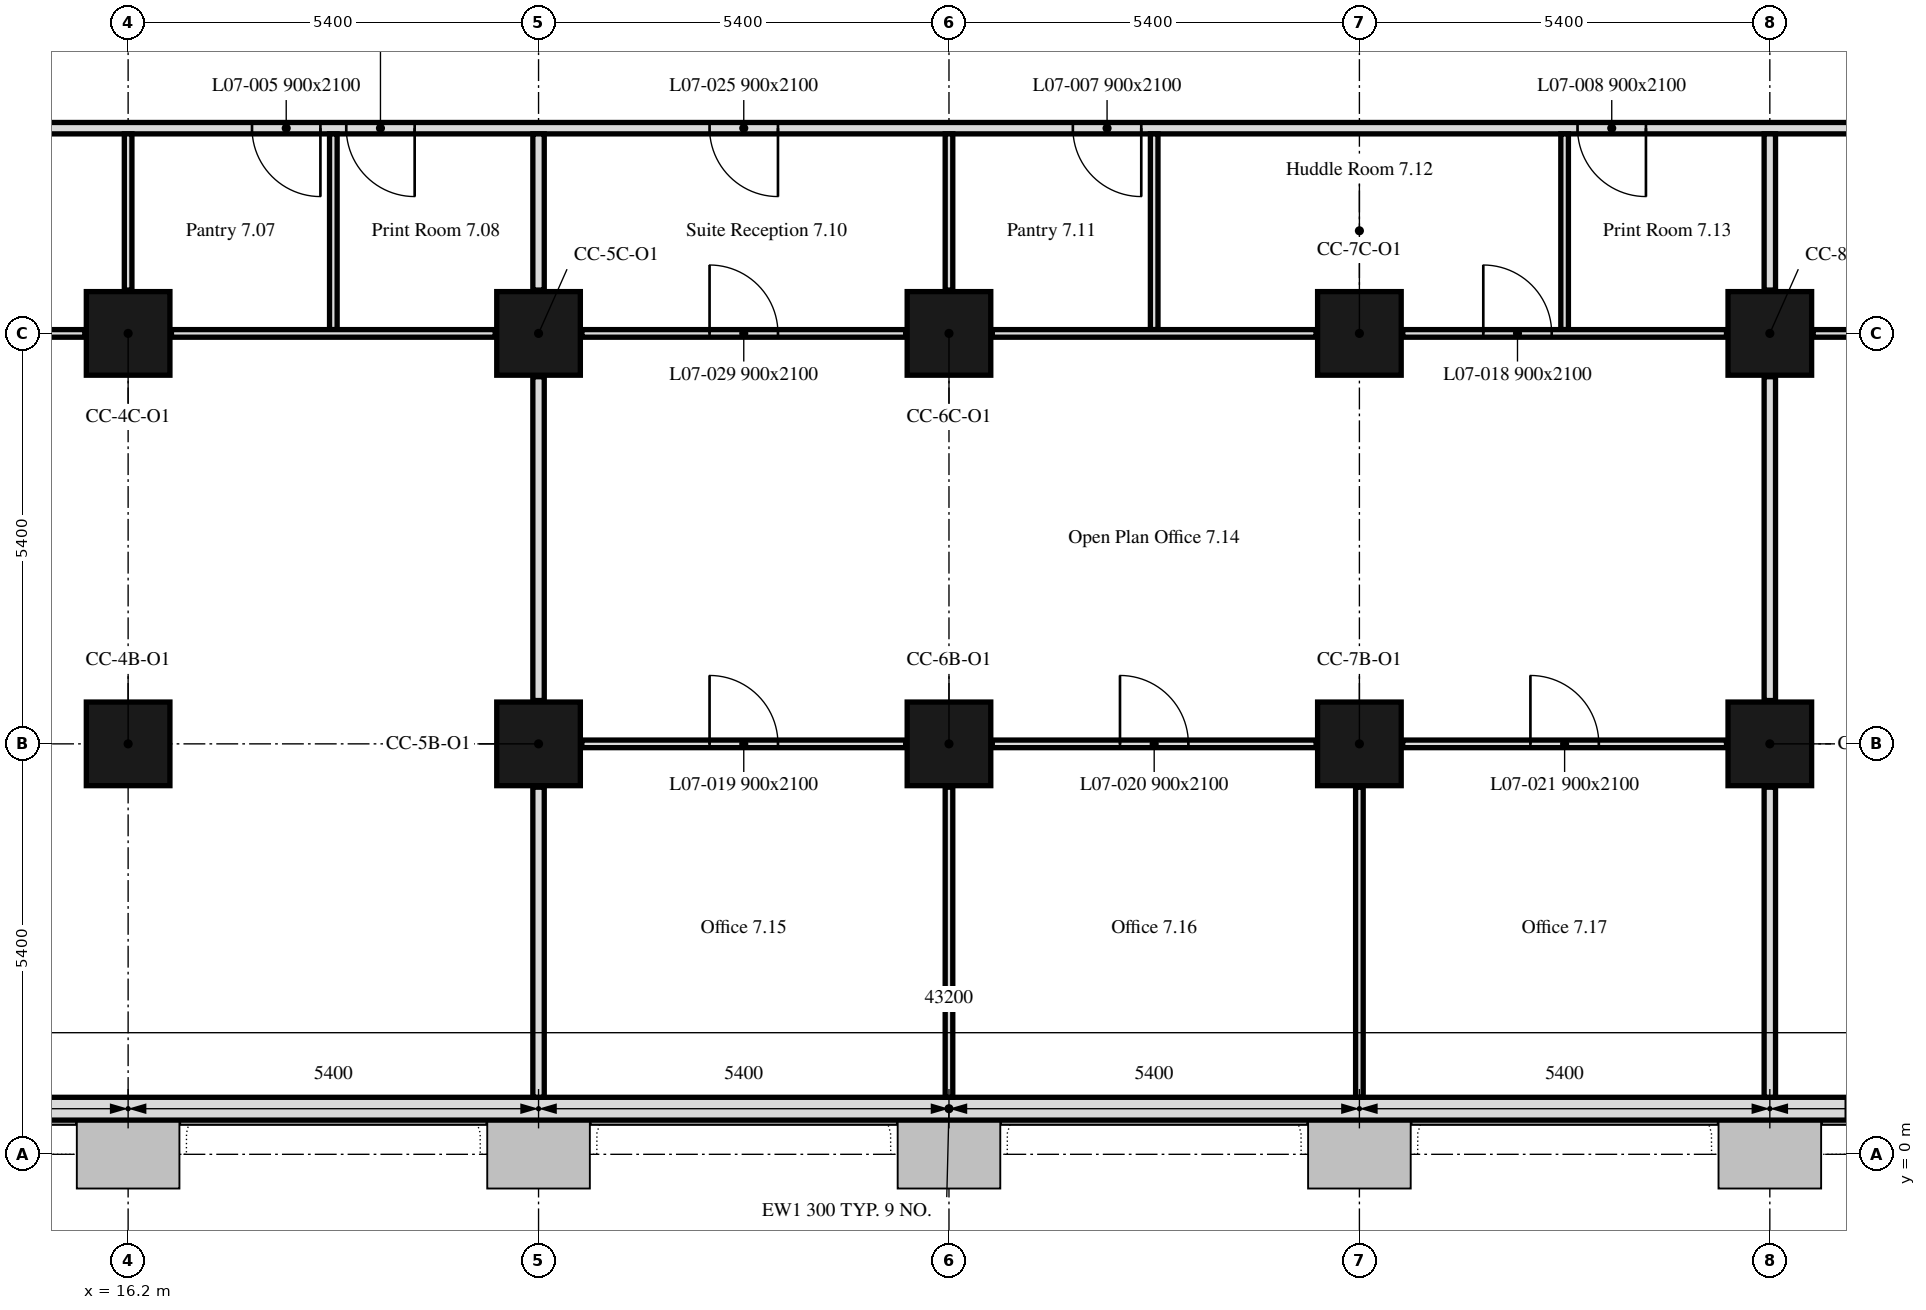
"""IFC4 building model, lengths in metres.
Left out: names, types, materials, properties, quantities, classifications, styles, units other than length and angle.
Written with IfcOpenShell. Run it as: python <this file> out.ifc"""

import sys

from ifc_helpers import new_model, si_unit, direction, frame, frame_2d, origin, origin_2d, place, context, subcontext, project, spatial, rectangle, extrude, element, fill, save


model = new_model("IFC4")
c1 = context("Model", 3, precision=1e-05, world=origin(), true_north=direction((0.0, 1.0)))
c2 = subcontext(c1, "Body", "Model", "MODEL_VIEW")
j1 = project(units=[si_unit("LENGTHUNIT", "METRE"), si_unit("PLANEANGLEUNIT", "RADIAN")], contexts=[c1])
p1 = place(None, origin())
s1 = spatial("IfcSite", under=j1, at=p1, CompositionType="ELEMENT")
p2 = place(p1, origin())
s2 = spatial("IfcBuilding", under=s1, at=p2, CompositionType="ELEMENT")
p3 = place(p2, frame((0.0, 0.0, 37.4)))
s3 = spatial("IfcBuildingStorey", under=s2, at=p3, CompositionType="ELEMENT", Elevation=37.4)
for number, where, z_axis, x_axis in (
    (1, (16.2, 5.4, 0.0), (0.0, 0.0, 1.0), (1.0, 0.0, 0.0)),
    (2, (21.6, 5.4, 0.0), (0.0, 0.0, 1.0), (1.0, 0.0, 0.0)),
    (3, (27.0, 5.4, 0.0), (0.0, 0.0, 1.0), (1.0, 0.0, 0.0)),
    (4, (32.4, 5.4, 0.0), (0.0, 0.0, 1.0), (1.0, 0.0, 0.0)),
    (5, (37.8, 5.4, 0.0), (0.0, 0.0, 1.0), (1.0, 0.0, 0.0)),
    (6, (16.2, 10.8, 0.0), (0.0, 0.0, 1.0), (1.0, 0.0, 0.0)),
    (7, (21.6, 10.8, 0.0), (0.0, 0.0, 1.0), (1.0, 0.0, 0.0)),
    (8, (27.0, 10.8, 0.0), (0.0, 0.0, 1.0), (1.0, 0.0, 0.0)),
    (9, (32.4, 10.8, 0.0), (0.0, 0.0, 1.0), (1.0, 0.0, 0.0)),
    (10, (37.8, 10.8, 0.0), (0.0, 0.0, 1.0), (1.0, 0.0, 0.0)),
):
    element("IfcColumn", number, at=place(p3, frame(where, z_axis=z_axis, x_axis=x_axis)), inside=s3, PredefinedType="COLUMN", context=c2, shape_type="SweptSolid", body=[
        extrude(rectangle(XDim=1.1, YDim=1.1, at=origin_2d()), origin(), (0.0, 0.0, 1.0), 3.5),
    ])
p4 = place(p3, frame((10.986, 0.6, 0.0), z_axis=(0.0, 0.0, 1.0), x_axis=(1.0, 0.0, 0.0)))
e11 = element("IfcWall", 11, at=p4, inside=s3, PredefinedType="SOLIDWALL", context=c2, shape_type="SweptSolid", body=[
    extrude(rectangle(XDim=32.027, YDim=0.3, at=frame_2d((16.014, 0.0))), origin(), (0.0, 0.0, 1.0), 3.5),
])
p5 = place(p4, frame((27.814, 0.0, 0.9)))
e12 = element("IfcOpeningElement", 12, at=p5, cuts=e11, PredefinedType="OPENING", context=c2, shape_type="SweptSolid", body=[
    extrude(rectangle(XDim=3.4, YDim=1.7, at=frame_2d((1.7, 0.85))), frame((0.0, 0.16, 0.0), z_axis=(0.0, -1.0, 0.0), x_axis=(1.0, 0.0, 0.0)), (0.0, 0.0, 1.0), 0.32),
])
p6 = place(p3, frame((47.849, 13.5, 0.0), z_axis=(0.0, 0.0, 1.0), x_axis=(-1.0, 0.0, 0.0)))
e13 = element("IfcWall", 13, at=p6, inside=s3, PredefinedType="PARTITIONING", context=c2, shape_type="SweptSolid", body=[
    extrude(rectangle(XDim=41.698, YDim=0.15, at=frame_2d((20.849, 0.0))), origin(), (0.0, 0.0, 1.0), 2.75),
])
p7 = place(p6, frame((29.119, 0.0, 0.0)))
e14 = element("IfcOpeningElement", 14, at=p7, cuts=e13, PredefinedType="OPENING", context=c2, shape_type="SweptSolid", body=[
    extrude(rectangle(XDim=0.9, YDim=2.1, at=frame_2d((0.45, 1.05))), frame((0.0, 0.075, 0.0), z_axis=(0.0, -1.0, 0.0), x_axis=(1.0, 0.0, 0.0)), (0.0, 0.0, 1.0), 0.15),
])
p8 = place(p6, frame((27.879, 0.0, 0.0)))
e15 = element("IfcOpeningElement", 15, at=p8, cuts=e13, PredefinedType="OPENING", context=c2, shape_type="SweptSolid", body=[
    extrude(rectangle(XDim=0.9, YDim=2.1, at=frame_2d((0.45, 1.05))), frame((0.0, 0.075, 0.0), z_axis=(0.0, -1.0, 0.0), x_axis=(1.0, 0.0, 0.0)), (0.0, 0.0, 1.0), 0.15),
])
p9 = place(p6, frame((18.319, 0.0, 0.0)))
e16 = element("IfcOpeningElement", 16, at=p9, cuts=e13, PredefinedType="OPENING", context=c2, shape_type="SweptSolid", body=[
    extrude(rectangle(XDim=0.9, YDim=2.1, at=frame_2d((0.45, 1.05))), frame((0.0, 0.075, 0.0), z_axis=(0.0, -1.0, 0.0), x_axis=(1.0, 0.0, 0.0)), (0.0, 0.0, 1.0), 0.15),
])
p10 = place(p6, frame((11.679, 0.0, 0.0)))
e17 = element("IfcOpeningElement", 17, at=p10, cuts=e13, PredefinedType="OPENING", context=c2, shape_type="SweptSolid", body=[
    extrude(rectangle(XDim=0.9, YDim=2.1, at=frame_2d((0.45, 1.05))), frame((0.0, 0.075, 0.0), z_axis=(0.0, -1.0, 0.0), x_axis=(1.0, 0.0, 0.0)), (0.0, 0.0, 1.0), 0.15),
])
p11 = place(p6, frame((38.624, 0.0, 0.0)))
e18 = element("IfcOpeningElement", 18, at=p11, cuts=e13, PredefinedType="OPENING", context=c2, shape_type="SweptSolid", body=[
    extrude(rectangle(XDim=0.9, YDim=2.1, at=frame_2d((0.45, 1.05))), frame((0.0, 0.075, 0.0), z_axis=(0.0, -1.0, 0.0), x_axis=(1.0, 0.0, 0.0)), (0.0, 0.0, 1.0), 0.15),
])
p12 = place(p6, frame((23.099, 0.0, 0.0)))
e19 = element("IfcOpeningElement", 19, at=p12, cuts=e13, PredefinedType="OPENING", context=c2, shape_type="SweptSolid", body=[
    extrude(rectangle(XDim=0.9, YDim=2.1, at=frame_2d((0.45, 1.05))), frame((0.0, 0.075, 0.0), z_axis=(0.0, -1.0, 0.0), x_axis=(1.0, 0.0, 0.0)), (0.0, 0.0, 1.0), 0.15),
])
p13 = place(p6, frame((6.899, 0.0, 0.0)))
e20 = element("IfcOpeningElement", 20, at=p13, cuts=e13, PredefinedType="OPENING", context=c2, shape_type="SweptSolid", body=[
    extrude(rectangle(XDim=0.9, YDim=2.1, at=frame_2d((0.45, 1.05))), frame((0.0, 0.075, 0.0), z_axis=(0.0, -1.0, 0.0), x_axis=(1.0, 0.0, 0.0)), (0.0, 0.0, 1.0), 0.15),
])
p14 = place(p3, frame((11.37, 10.8, 0.0), z_axis=(0.0, 0.0, 1.0), x_axis=(1.0, 0.0, 0.0)))
e21 = element("IfcWall", 21, at=p14, inside=s3, PredefinedType="PARTITIONING", context=c2, shape_type="SweptSolid", body=[
    extrude(rectangle(XDim=4.26, YDim=0.1, at=frame_2d((2.13, 0.0))), origin(), (0.0, 0.0, 1.0), 3.5),
])
p15 = place(p14, frame((1.68, 0.0, 0.0)))
e22 = element("IfcOpeningElement", 22, at=p15, cuts=e21, PredefinedType="OPENING", context=c2, shape_type="SweptSolid", body=[
    extrude(rectangle(XDim=0.9, YDim=2.1, at=frame_2d((0.45, 1.05))), frame((0.0, 0.05, 0.0), z_axis=(0.0, -1.0, 0.0), x_axis=(1.0, 0.0, 0.0)), (0.0, 0.0, 1.0), 0.1),
])
p16 = place(p3, frame((16.2, 11.37, 0.0), z_axis=(0.0, 0.0, 1.0), x_axis=(0.0, 1.0, 0.0)))
e23 = element("IfcWall", 23, at=p16, inside=s3, PredefinedType="PARTITIONING", context=c2, shape_type="SweptSolid", body=[
    extrude(rectangle(XDim=2.055, YDim=0.1, at=frame_2d((1.027, 0.0))), origin(), (0.0, 0.0, 1.0), 2.75),
])
p17 = place(p3, frame((18.9, 10.85, 0.0), z_axis=(0.0, 0.0, 1.0), x_axis=(0.0, 1.0, 0.0)))
e24 = element("IfcWall", 24, at=p17, inside=s3, PredefinedType="PARTITIONING", context=c2, shape_type="SweptSolid", body=[
    extrude(rectangle(XDim=2.575, YDim=0.1, at=frame_2d((1.288, 0.0))), origin(), (0.0, 0.0, 1.0), 3.5),
])
p18 = place(p3, frame((16.77, 10.8, 0.0), z_axis=(0.0, 0.0, 1.0), x_axis=(1.0, 0.0, 0.0)))
e25 = element("IfcWall", 25, at=p18, inside=s3, PredefinedType="PARTITIONING", context=c2, shape_type="SweptSolid", body=[
    extrude(rectangle(XDim=4.26, YDim=0.1, at=frame_2d((2.13, 0.0))), origin(), (0.0, 0.0, 1.0), 3.5),
])
p19 = place(p3, frame((21.6, 11.37, 0.0), z_axis=(0.0, 0.0, 1.0), x_axis=(0.0, 1.0, 0.0)))
e26 = element("IfcWall", 26, at=p19, inside=s3, PredefinedType="PARTITIONING", context=c2, shape_type="SweptSolid", body=[
    extrude(rectangle(XDim=2.055, YDim=0.15, at=frame_2d((1.027, 0.0))), origin(), (0.0, 0.0, 1.0), 2.75),
])
p20 = place(p3, frame((21.6, 10.23, 0.0), z_axis=(0.0, 0.0, 1.0), x_axis=(0.0, -1.0, 0.0)))
e27 = element("IfcWall", 27, at=p20, inside=s3, PredefinedType="PARTITIONING", context=c2, shape_type="SweptSolid", body=[
    extrude(rectangle(XDim=4.26, YDim=0.15, at=frame_2d((2.13, 0.0))), origin(), (0.0, 0.0, 1.0), 2.75),
])
p21 = place(p3, frame((21.6, 4.83, 0.0), z_axis=(0.0, 0.0, 1.0), x_axis=(0.0, -1.0, 0.0)))
e28 = element("IfcWall", 28, at=p21, inside=s3, PredefinedType="PARTITIONING", context=c2, shape_type="SweptSolid", body=[
    extrude(rectangle(XDim=4.079, YDim=0.15, at=frame_2d((2.04, 0.0))), origin(), (0.0, 0.0, 1.0), 2.75),
])
p22 = place(p3, frame((22.17, 10.8, 0.0), z_axis=(0.0, 0.0, 1.0), x_axis=(1.0, 0.0, 0.0)))
e29 = element("IfcWall", 29, at=p22, inside=s3, PredefinedType="PARTITIONING", context=c2, shape_type="SweptSolid", body=[
    extrude(rectangle(XDim=4.26, YDim=0.1, at=frame_2d((2.13, 0.0))), origin(), (0.0, 0.0, 1.0), 3.5),
])
p23 = place(p22, frame((1.68, 0.0, 0.0)))
e30 = element("IfcOpeningElement", 30, at=p23, cuts=e29, PredefinedType="OPENING", context=c2, shape_type="SweptSolid", body=[
    extrude(rectangle(XDim=0.9, YDim=2.1, at=frame_2d((0.45, 1.05))), frame((0.0, 0.05, 0.0), z_axis=(0.0, -1.0, 0.0), x_axis=(1.0, 0.0, 0.0)), (0.0, 0.0, 1.0), 0.1),
])
p24 = place(p3, frame((27.0, 11.37, 0.0), z_axis=(0.0, 0.0, 1.0), x_axis=(0.0, 1.0, 0.0)))
e31 = element("IfcWall", 31, at=p24, inside=s3, PredefinedType="PARTITIONING", context=c2, shape_type="SweptSolid", body=[
    extrude(rectangle(XDim=2.055, YDim=0.1, at=frame_2d((1.027, 0.0))), origin(), (0.0, 0.0, 1.0), 2.75),
])
p25 = place(p3, frame((29.7, 10.85, 0.0), z_axis=(0.0, 0.0, 1.0), x_axis=(0.0, 1.0, 0.0)))
e32 = element("IfcWall", 32, at=p25, inside=s3, PredefinedType="PARTITIONING", context=c2, shape_type="SweptSolid", body=[
    extrude(rectangle(XDim=2.575, YDim=0.1, at=frame_2d((1.288, 0.0))), origin(), (0.0, 0.0, 1.0), 3.5),
])
p26 = place(p3, frame((27.57, 10.8, 0.0), z_axis=(0.0, 0.0, 1.0), x_axis=(1.0, 0.0, 0.0)))
e33 = element("IfcWall", 33, at=p26, inside=s3, PredefinedType="PARTITIONING", context=c2, shape_type="SweptSolid", body=[
    extrude(rectangle(XDim=4.26, YDim=0.1, at=frame_2d((2.13, 0.0))), origin(), (0.0, 0.0, 1.0), 3.5),
])
p27 = place(p3, frame((35.1, 10.85, 0.0), z_axis=(0.0, 0.0, 1.0), x_axis=(0.0, 1.0, 0.0)))
e34 = element("IfcWall", 34, at=p27, inside=s3, PredefinedType="PARTITIONING", context=c2, shape_type="SweptSolid", body=[
    extrude(rectangle(XDim=2.575, YDim=0.1, at=frame_2d((1.288, 0.0))), origin(), (0.0, 0.0, 1.0), 3.5),
])
p28 = place(p3, frame((32.97, 10.8, 0.0), z_axis=(0.0, 0.0, 1.0), x_axis=(1.0, 0.0, 0.0)))
e35 = element("IfcWall", 35, at=p28, inside=s3, PredefinedType="PARTITIONING", context=c2, shape_type="SweptSolid", body=[
    extrude(rectangle(XDim=4.26, YDim=0.1, at=frame_2d((2.13, 0.0))), origin(), (0.0, 0.0, 1.0), 2.75),
])
p29 = place(p28, frame((1.06, 0.0, 0.0)))
e36 = element("IfcOpeningElement", 36, at=p29, cuts=e35, PredefinedType="OPENING", context=c2, shape_type="SweptSolid", body=[
    extrude(rectangle(XDim=0.9, YDim=2.1, at=frame_2d((0.45, 1.05))), frame((0.0, 0.05, 0.0), z_axis=(0.0, -1.0, 0.0), x_axis=(1.0, 0.0, 0.0)), (0.0, 0.0, 1.0), 0.1),
])
p30 = place(p3, frame((37.8, 11.37, 0.0), z_axis=(0.0, 0.0, 1.0), x_axis=(0.0, 1.0, 0.0)))
e37 = element("IfcWall", 37, at=p30, inside=s3, PredefinedType="PARTITIONING", context=c2, shape_type="SweptSolid", body=[
    extrude(rectangle(XDim=2.055, YDim=0.15, at=frame_2d((1.027, 0.0))), origin(), (0.0, 0.0, 1.0), 2.75),
])
p31 = place(p3, frame((22.17, 5.4, 0.0), z_axis=(0.0, 0.0, 1.0), x_axis=(1.0, 0.0, 0.0)))
e38 = element("IfcWall", 38, at=p31, inside=s3, PredefinedType="PARTITIONING", context=c2, shape_type="SweptSolid", body=[
    extrude(rectangle(XDim=4.26, YDim=0.1, at=frame_2d((2.13, 0.0))), origin(), (0.0, 0.0, 1.0), 3.5),
])
p32 = place(p31, frame((1.68, 0.0, 0.0)))
e39 = element("IfcOpeningElement", 39, at=p32, cuts=e38, PredefinedType="OPENING", context=c2, shape_type="SweptSolid", body=[
    extrude(rectangle(XDim=0.9, YDim=2.1, at=frame_2d((0.45, 1.05))), frame((0.0, 0.05, 0.0), z_axis=(0.0, -1.0, 0.0), x_axis=(1.0, 0.0, 0.0)), (0.0, 0.0, 1.0), 0.1),
])
p33 = place(p3, frame((27.57, 5.4, 0.0), z_axis=(0.0, 0.0, 1.0), x_axis=(1.0, 0.0, 0.0)))
e40 = element("IfcWall", 40, at=p33, inside=s3, PredefinedType="PARTITIONING", context=c2, shape_type="SweptSolid", body=[
    extrude(rectangle(XDim=4.26, YDim=0.1, at=frame_2d((2.13, 0.0))), origin(), (0.0, 0.0, 1.0), 3.5),
])
p34 = place(p33, frame((1.68, 0.0, 0.0)))
e41 = element("IfcOpeningElement", 41, at=p34, cuts=e40, PredefinedType="OPENING", context=c2, shape_type="SweptSolid", body=[
    extrude(rectangle(XDim=0.9, YDim=2.1, at=frame_2d((0.45, 1.05))), frame((0.0, 0.05, 0.0), z_axis=(0.0, -1.0, 0.0), x_axis=(1.0, 0.0, 0.0)), (0.0, 0.0, 1.0), 0.1),
])
p35 = place(p3, frame((32.97, 5.4, 0.0), z_axis=(0.0, 0.0, 1.0), x_axis=(1.0, 0.0, 0.0)))
e42 = element("IfcWall", 42, at=p35, inside=s3, PredefinedType="PARTITIONING", context=c2, shape_type="SweptSolid", body=[
    extrude(rectangle(XDim=4.26, YDim=0.1, at=frame_2d((2.13, 0.0))), origin(), (0.0, 0.0, 1.0), 3.5),
])
p36 = place(p35, frame((1.68, 0.0, 0.0)))
e43 = element("IfcOpeningElement", 43, at=p36, cuts=e42, PredefinedType="OPENING", context=c2, shape_type="SweptSolid", body=[
    extrude(rectangle(XDim=0.9, YDim=2.1, at=frame_2d((0.45, 1.05))), frame((0.0, 0.05, 0.0), z_axis=(0.0, -1.0, 0.0), x_axis=(1.0, 0.0, 0.0)), (0.0, 0.0, 1.0), 0.1),
])
p37 = place(p3, frame((37.8, 5.97, 0.0), z_axis=(0.0, 0.0, 1.0), x_axis=(0.0, 1.0, 0.0)))
e44 = element("IfcWall", 44, at=p37, inside=s3, PredefinedType="PARTITIONING", context=c2, shape_type="SweptSolid", body=[
    extrude(rectangle(XDim=4.26, YDim=0.15, at=frame_2d((2.13, 0.0))), origin(), (0.0, 0.0, 1.0), 2.75),
])
for number, where, z_axis, x_axis in (
    (45, (27.0, 4.83, 0.0), (0.0, 0.0, 1.0), (0.0, -1.0, 0.0)),
    (46, (32.4, 4.83, 0.0), (0.0, 0.0, 1.0), (0.0, -1.0, 0.0)),
):
    element("IfcWall", number, at=place(p3, frame(where, z_axis=z_axis, x_axis=x_axis)), inside=s3, PredefinedType="PARTITIONING", context=c2, shape_type="SweptSolid", body=[
        extrude(rectangle(XDim=4.079, YDim=0.1, at=frame_2d((2.04, 0.0))), origin(), (0.0, 0.0, 1.0), 2.75),
    ])
p38 = place(p3, frame((37.8, 4.83, 0.0), z_axis=(0.0, 0.0, 1.0), x_axis=(0.0, -1.0, 0.0)))
e47 = element("IfcWall", 47, at=p38, inside=s3, PredefinedType="PARTITIONING", context=c2, shape_type="SweptSolid", body=[
    extrude(rectangle(XDim=4.079, YDim=0.15, at=frame_2d((2.04, 0.0))), origin(), (0.0, 0.0, 1.0), 2.75),
])
p39 = place(p3, frame((38.37, 10.8, 0.0), z_axis=(0.0, 0.0, 1.0), x_axis=(1.0, 0.0, 0.0)))
e48 = element("IfcWall", 48, at=p39, inside=s3, PredefinedType="PARTITIONING", context=c2, shape_type="SweptSolid", body=[
    extrude(rectangle(XDim=4.26, YDim=0.1, at=frame_2d((2.13, 0.0))), origin(), (0.0, 0.0, 1.0), 2.75),
])
p40 = place(p39, frame((1.68, 0.0, 0.0)))
e49 = element("IfcOpeningElement", 49, at=p40, cuts=e48, PredefinedType="OPENING", context=c2, shape_type="SweptSolid", body=[
    extrude(rectangle(XDim=0.9, YDim=2.1, at=frame_2d((0.45, 1.05))), frame((0.0, 0.05, 0.0), z_axis=(0.0, -1.0, 0.0), x_axis=(1.0, 0.0, 0.0)), (0.0, 0.0, 1.0), 0.1),
])
p41 = place(p7, origin())
e50 = element("IfcDoor", 50, at=p41, inside=s3, OperationType="SINGLE_SWING_RIGHT", PredefinedType="DOOR", context=c2, shape_type="SweptSolid", body=[
    extrude(rectangle(XDim=0.9, YDim=2.1, at=frame_2d((0.45, 1.05))), frame((0.0, 0.025, 0.0), z_axis=(0.0, -1.0, 0.0), x_axis=(1.0, 0.0, 0.0)), (0.0, 0.0, 1.0), 0.05),
])
fill(e14, e50)
p42 = place(p8, origin())
e51 = element("IfcDoor", 51, at=p42, inside=s3, OperationType="SINGLE_SWING_RIGHT", PredefinedType="DOOR", context=c2, shape_type="SweptSolid", body=[
    extrude(rectangle(XDim=0.9, YDim=2.1, at=frame_2d((0.45, 1.05))), frame((0.0, 0.025, 0.0), z_axis=(0.0, -1.0, 0.0), x_axis=(1.0, 0.0, 0.0)), (0.0, 0.0, 1.0), 0.05),
])
fill(e15, e51)
p43 = place(p9, origin())
e52 = element("IfcDoor", 52, at=p43, inside=s3, OperationType="SINGLE_SWING_RIGHT", PredefinedType="DOOR", context=c2, shape_type="SweptSolid", body=[
    extrude(rectangle(XDim=0.9, YDim=2.1, at=frame_2d((0.45, 1.05))), frame((0.0, 0.025, 0.0), z_axis=(0.0, -1.0, 0.0), x_axis=(1.0, 0.0, 0.0)), (0.0, 0.0, 1.0), 0.05),
])
fill(e16, e52)
p44 = place(p10, origin())
e53 = element("IfcDoor", 53, at=p44, inside=s3, OperationType="SINGLE_SWING_RIGHT", PredefinedType="DOOR", context=c2, shape_type="SweptSolid", body=[
    extrude(rectangle(XDim=0.9, YDim=2.1, at=frame_2d((0.45, 1.05))), frame((0.0, 0.025, 0.0), z_axis=(0.0, -1.0, 0.0), x_axis=(1.0, 0.0, 0.0)), (0.0, 0.0, 1.0), 0.05),
])
fill(e17, e53)
p45 = place(p29, origin())
e54 = element("IfcDoor", 54, at=p45, inside=s3, OperationType="SINGLE_SWING_LEFT", PredefinedType="DOOR", context=c2, shape_type="SweptSolid", body=[
    extrude(rectangle(XDim=0.9, YDim=2.1, at=frame_2d((0.45, 1.05))), frame((0.0, 0.025, 0.0), z_axis=(0.0, -1.0, 0.0), x_axis=(1.0, 0.0, 0.0)), (0.0, 0.0, 1.0), 0.05),
])
fill(e36, e54)
p46 = place(p32, origin())
e55 = element("IfcDoor", 55, at=p46, inside=s3, OperationType="SINGLE_SWING_LEFT", PredefinedType="DOOR", context=c2, shape_type="SweptSolid", body=[
    extrude(rectangle(XDim=0.9, YDim=2.1, at=frame_2d((0.45, 1.05))), frame((0.0, 0.025, 0.0), z_axis=(0.0, -1.0, 0.0), x_axis=(1.0, 0.0, 0.0)), (0.0, 0.0, 1.0), 0.05),
])
fill(e39, e55)
p47 = place(p34, origin())
e56 = element("IfcDoor", 56, at=p47, inside=s3, OperationType="SINGLE_SWING_LEFT", PredefinedType="DOOR", context=c2, shape_type="SweptSolid", body=[
    extrude(rectangle(XDim=0.9, YDim=2.1, at=frame_2d((0.45, 1.05))), frame((0.0, 0.025, 0.0), z_axis=(0.0, -1.0, 0.0), x_axis=(1.0, 0.0, 0.0)), (0.0, 0.0, 1.0), 0.05),
])
fill(e41, e56)
p48 = place(p36, origin())
e57 = element("IfcDoor", 57, at=p48, inside=s3, OperationType="SINGLE_SWING_LEFT", PredefinedType="DOOR", context=c2, shape_type="SweptSolid", body=[
    extrude(rectangle(XDim=0.9, YDim=2.1, at=frame_2d((0.45, 1.05))), frame((0.0, 0.025, 0.0), z_axis=(0.0, -1.0, 0.0), x_axis=(1.0, 0.0, 0.0)), (0.0, 0.0, 1.0), 0.05),
])
fill(e43, e57)
p49 = place(p12, origin())
e58 = element("IfcDoor", 58, at=p49, inside=s3, OperationType="SINGLE_SWING_RIGHT", PredefinedType="DOOR", context=c2, shape_type="SweptSolid", body=[
    extrude(rectangle(XDim=0.9, YDim=2.1, at=frame_2d((0.45, 1.05))), frame((0.0, 0.025, 0.0), z_axis=(0.0, -1.0, 0.0), x_axis=(1.0, 0.0, 0.0)), (0.0, 0.0, 1.0), 0.05),
])
fill(e19, e58)
p50 = place(p23, origin())
e59 = element("IfcDoor", 59, at=p50, inside=s3, OperationType="SINGLE_SWING_RIGHT", PredefinedType="DOOR", context=c2, shape_type="SweptSolid", body=[
    extrude(rectangle(XDim=0.9, YDim=2.1, at=frame_2d((0.45, 1.05))), frame((0.0, 0.025, 0.0), z_axis=(0.0, -1.0, 0.0), x_axis=(1.0, 0.0, 0.0)), (0.0, 0.0, 1.0), 0.05),
])
fill(e30, e59)
save(model, sys.argv[1])
